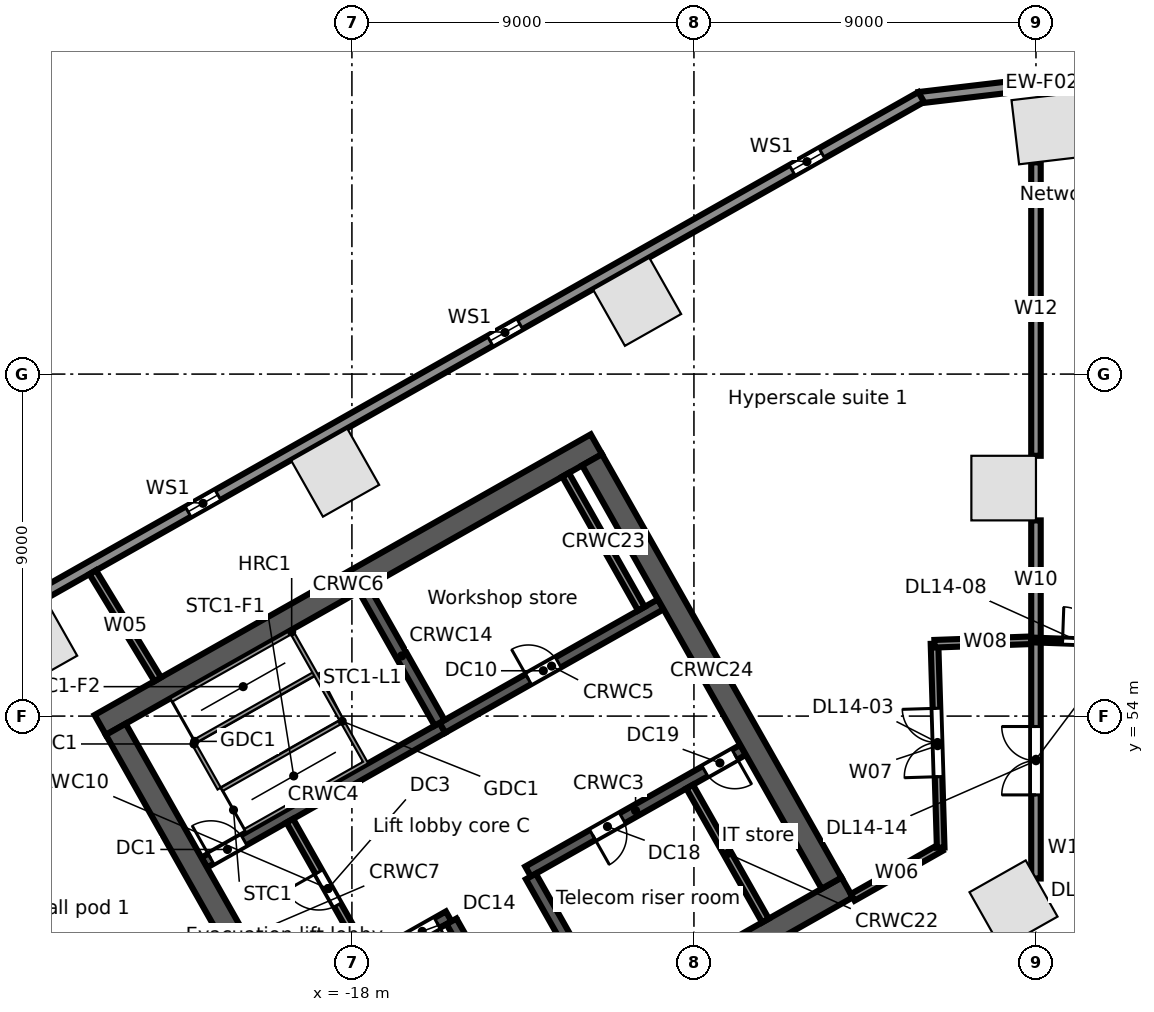
"""IFC4 building model, lengths in metres.
Left out: names, types, materials, properties, quantities, classifications, styles, units other than length and angle.
Written with IfcOpenShell. Run it as: python <this file> out.ifc"""

import sys

from ifc_helpers import new_model, si_unit, direction, frame, frame_2d, origin, origin_2d, place, context, subcontext, project, spatial, rectangle, extrude, element, fill, save


model = new_model("IFC4")
c1 = context("Model", 3, precision=1e-05, world=origin(), true_north=direction((0.0, 1.0)))
c2 = subcontext(c1, "Body", "Model", "MODEL_VIEW")
j1 = project(units=[si_unit("LENGTHUNIT", "METRE"), si_unit("PLANEANGLEUNIT", "RADIAN")], contexts=[c1])
p1 = place(None, origin())
s1 = spatial("IfcSite", under=j1, at=p1, CompositionType="ELEMENT")
p2 = place(p1, origin())
s2 = spatial("IfcBuilding", under=s1, at=p2, CompositionType="ELEMENT")
p3 = place(p2, frame((0.0, 0.0, 71.5)))
s3 = spatial("IfcBuildingStorey", under=s2, at=p3, CompositionType="ELEMENT", Elevation=71.5)
for number, where, z_axis, x_axis in (
    (1, (0.3, 69.464, 0.0), (0.0, 0.0, 1.0), (-0.993, -0.118, 0.0)),
    (2, (-10.495, 64.902, 0.0), (0.0, 0.0, 1.0), (-0.87, -0.492, 0.0)),
    (3, (-18.441, 60.406, 0.0), (0.0, 0.0, 1.0), (-0.87, -0.492, 0.0)),
    (4, (-26.388, 55.91, 0.0), (0.0, 0.0, 1.0), (-0.87, -0.492, 0.0)),
    (5, (-0.591, 49.044, 0.0), (0.0, 0.0, 1.0), (0.87, 0.492, 0.0)),
    (6, (-0.85, 60.0, 0.0), (0.0, 0.0, 1.0), (0.0, 1.0, 0.0)),
):
    element("IfcColumn", number, at=place(p3, frame(where, z_axis=z_axis, x_axis=x_axis)), inside=s3, PredefinedType="COLUMN", context=c2, shape_type="SweptSolid", body=[
        extrude(rectangle(XDim=1.7, YDim=1.7, at=origin_2d()), origin(), (0.0, 0.0, 1.0), 5.0),
    ])
p4 = place(p3, frame((-3.076, 70.273, 0.0), z_axis=(0.0, 0.0, 1.0), x_axis=(0.993067743007, 0.117543429416, 0.0)))
e7 = element("IfcWall", 7, at=p4, inside=s3, PredefinedType="STANDARD", context=c2, shape_type="SweptSolid", body=[
    extrude(rectangle(XDim=6.516, YDim=0.3, at=frame_2d((3.258, 0.0))), origin(), (0.0, 0.0, 1.0), 4.68),
])
p5 = place(p3, frame((-58.745, 38.764, 0.0), z_axis=(0.0, 0.0, 1.0), x_axis=(0.870355811726, 0.492423355453, 0.0)))
e8 = element("IfcWall", 8, at=p5, inside=s3, PredefinedType="STANDARD", context=c2, shape_type="SweptSolid", body=[
    extrude(rectangle(XDim=64.025, YDim=0.3, at=frame_2d((32.013, 0.0))), origin(), (0.0, 0.0, 1.0), 4.68),
])
p6 = place(p5, frame((60.122, 0.0, 0.6)))
e9 = element("IfcOpeningElement", 9, at=p6, cuts=e8, PredefinedType="OPENING", context=c2, shape_type="SweptSolid", body=[
    extrude(rectangle(XDim=0.9, YDim=3.2, at=frame_2d((0.45, 1.6))), frame((0.0, 0.16, 0.0), z_axis=(0.0, -1.0, 0.0), x_axis=(1.0, 0.0, 0.0)), (0.0, 0.0, 1.0), 0.32),
])
p7 = place(p5, frame((50.992, 0.0, 0.6)))
e10 = element("IfcOpeningElement", 10, at=p7, cuts=e8, PredefinedType="OPENING", context=c2, shape_type="SweptSolid", body=[
    extrude(rectangle(XDim=0.9, YDim=3.2, at=frame_2d((0.45, 1.6))), frame((0.0, 0.16, 0.0), z_axis=(0.0, -1.0, 0.0), x_axis=(1.0, 0.0, 0.0)), (0.0, 0.0, 1.0), 0.32),
])
p8 = place(p5, frame((41.862, 0.0, 0.6)))
e11 = element("IfcOpeningElement", 11, at=p8, cuts=e8, PredefinedType="OPENING", context=c2, shape_type="SweptSolid", body=[
    extrude(rectangle(XDim=0.9, YDim=3.2, at=frame_2d((0.45, 1.6))), frame((0.0, 0.16, 0.0), z_axis=(0.0, -1.0, 0.0), x_axis=(1.0, 0.0, 0.0)), (0.0, 0.0, 1.0), 0.32),
])
p9 = place(p5, frame((32.732, 0.0, 0.6)))
e12 = element("IfcOpeningElement", 12, at=p9, cuts=e8, PredefinedType="OPENING", context=c2, shape_type="SweptSolid", body=[
    extrude(rectangle(XDim=0.9, YDim=3.2, at=frame_2d((0.45, 1.6))), frame((0.0, 0.16, 0.0), z_axis=(0.0, -1.0, 0.0), x_axis=(1.0, 0.0, 0.0)), (0.0, 0.0, 1.0), 0.32),
])
p10 = place(p5, frame((23.602, 0.0, 0.6)))
e13 = element("IfcOpeningElement", 13, at=p10, cuts=e8, PredefinedType="OPENING", context=c2, shape_type="SweptSolid", body=[
    extrude(rectangle(XDim=0.9, YDim=3.2, at=frame_2d((0.45, 1.6))), frame((0.0, 0.16, 0.0), z_axis=(0.0, -1.0, 0.0), x_axis=(1.0, 0.0, 0.0)), (0.0, 0.0, 1.0), 0.32),
])
p11 = place(p5, frame((14.472, 0.0, 0.6)))
e14 = element("IfcOpeningElement", 14, at=p11, cuts=e8, PredefinedType="OPENING", context=c2, shape_type="SweptSolid", body=[
    extrude(rectangle(XDim=0.9, YDim=3.2, at=frame_2d((0.45, 1.6))), frame((0.0, 0.16, 0.0), z_axis=(0.0, -1.0, 0.0), x_axis=(1.0, 0.0, 0.0)), (0.0, 0.0, 1.0), 0.32),
])
p12 = place(p5, frame((5.342, 0.0, 0.6)))
e15 = element("IfcOpeningElement", 15, at=p12, cuts=e8, PredefinedType="OPENING", context=c2, shape_type="SweptSolid", body=[
    extrude(rectangle(XDim=0.9, YDim=3.2, at=frame_2d((0.45, 1.6))), frame((0.0, 0.16, 0.0), z_axis=(0.0, -1.0, 0.0), x_axis=(1.0, 0.0, 0.0)), (0.0, 0.0, 1.0), 0.32),
])
p13 = place(p3, frame((-31.778, 49.374, 0.0), z_axis=(0.0, 0.0, 1.0), x_axis=(0.492433046652, -0.870350328641, 0.0)))
e16 = element("IfcWall", 16, at=p13, inside=s3, PredefinedType="SOLIDWALL", context=c2, shape_type="SweptSolid", body=[
    extrude(rectangle(XDim=12.8, YDim=0.6, at=frame_2d((6.4, 0.0))), origin(), (0.0, 0.0, 1.0), 4.68),
])
p14 = place(p3, frame((-18.024, 42.104, 0.0), z_axis=(0.0, 0.0, 1.0), x_axis=(0.870360574057, 0.492414937962, 0.0)))
e17 = element("IfcWall", 17, at=p14, inside=s3, PredefinedType="SOLIDWALL", context=c2, shape_type="SweptSolid", body=[
    extrude(rectangle(XDim=15.0, YDim=0.6, at=frame_2d((7.5, 0.0))), origin(), (0.0, 0.0, 1.0), 4.68),
])
p15 = place(p14, frame((6.1, 0.0, 0.0)))
e18 = element("IfcOpeningElement", 18, at=p15, cuts=e17, PredefinedType="OPENING", context=c2, shape_type="SweptSolid", body=[
    extrude(rectangle(XDim=1.2, YDim=2.1, at=frame_2d((0.6, 1.05))), frame((0.0, 0.31, 0.0), z_axis=(0.0, -1.0, 0.0), x_axis=(1.0, 0.0, 0.0)), (0.0, 0.0, 1.0), 0.62),
])
p16 = place(p3, frame((-19.718, 46.316, 0.0), z_axis=(0.0, 0.0, 1.0), x_axis=(0.870353963862, 0.492426621528, 0.0)))
e19 = element("IfcWall", 19, at=p16, inside=s3, PredefinedType="SOLIDWALL", context=c2, shape_type="SweptSolid", body=[
    extrude(rectangle(XDim=4.9, YDim=0.3, at=frame_2d((2.45, 0.0))), origin(), (0.0, 0.0, 1.0), 4.68),
])
p17 = place(p16, frame((0.55, 0.0, 0.0)))
e20 = element("IfcOpeningElement", 20, at=p17, cuts=e19, PredefinedType="OPENING", context=c2, shape_type="SweptSolid", body=[
    extrude(rectangle(XDim=1.1, YDim=2.1, at=frame_2d((0.55, 1.05))), frame((0.0, 0.16, 0.0), z_axis=(0.0, -1.0, 0.0), x_axis=(1.0, 0.0, 0.0)), (0.0, 0.0, 1.0), 0.32),
])
p18 = place(p16, frame((3.65, 0.0, 0.0)))
e21 = element("IfcOpeningElement", 21, at=p18, cuts=e19, PredefinedType="OPENING", context=c2, shape_type="SweptSolid", body=[
    extrude(rectangle(XDim=0.9, YDim=2.1, at=frame_2d((0.45, 1.05))), frame((0.0, 0.16, 0.0), z_axis=(0.0, -1.0, 0.0), x_axis=(1.0, 0.0, 0.0)), (0.0, 0.0, 1.0), 0.32),
])
p19 = place(p3, frame((-13.365, 49.911, 0.0), z_axis=(0.0, 0.0, 1.0), x_axis=(0.870340995471, 0.49244954219, 0.0)))
e22 = element("IfcWall", 22, at=p19, inside=s3, PredefinedType="SOLIDWALL", context=c2, shape_type="SweptSolid", body=[
    extrude(rectangle(XDim=6.5, YDim=0.3, at=frame_2d((3.25, 0.0))), origin(), (0.0, 0.0, 1.0), 4.68),
])
p20 = place(p19, frame((1.95, 0.0, 0.0)))
e23 = element("IfcOpeningElement", 23, at=p20, cuts=e22, PredefinedType="OPENING", context=c2, shape_type="SweptSolid", body=[
    extrude(rectangle(XDim=0.9, YDim=2.1, at=frame_2d((0.45, 1.05))), frame((0.0, 0.16, 0.0), z_axis=(0.0, -1.0, 0.0), x_axis=(1.0, 0.0, 0.0)), (0.0, 0.0, 1.0), 0.32),
])
p21 = place(p19, frame((5.35, 0.0, 0.0)))
e24 = element("IfcOpeningElement", 24, at=p21, cuts=e22, PredefinedType="OPENING", context=c2, shape_type="SweptSolid", body=[
    extrude(rectangle(XDim=0.9, YDim=2.1, at=frame_2d((0.45, 1.05))), frame((0.0, 0.16, 0.0), z_axis=(0.0, -1.0, 0.0), x_axis=(1.0, 0.0, 0.0)), (0.0, 0.0, 1.0), 0.32),
])
p22 = place(p3, frame((-21.885, 50.146, 0.0), z_axis=(0.0, 0.0, 1.0), x_axis=(0.870359411463, 0.492416992881, 0.0)))
e25 = element("IfcWall", 25, at=p22, inside=s3, PredefinedType="SOLIDWALL", context=c2, shape_type="SweptSolid", body=[
    extrude(rectangle(XDim=7.2, YDim=0.3, at=frame_2d((3.6, 0.0))), origin(), (0.0, 0.0, 1.0), 4.68),
])
p23 = place(p22, frame((0.2, 0.0, 0.0)))
e26 = element("IfcOpeningElement", 26, at=p23, cuts=e25, PredefinedType="OPENING", context=c2, shape_type="SweptSolid", body=[
    extrude(rectangle(XDim=1.0, YDim=2.1, at=frame_2d((0.5, 1.05))), frame((0.0, 0.16, 0.0), z_axis=(0.0, -1.0, 0.0), x_axis=(1.0, 0.0, 0.0)), (0.0, 0.0, 1.0), 0.32),
])
p24 = place(p3, frame((-15.618, 53.691, 0.0), z_axis=(0.0, 0.0, 1.0), x_axis=(0.870356769198, 0.492421663121, 0.0)))
e27 = element("IfcWall", 27, at=p24, inside=s3, PredefinedType="SOLIDWALL", context=c2, shape_type="SweptSolid", body=[
    extrude(rectangle(XDim=6.6, YDim=0.3, at=frame_2d((3.3, 0.0))), origin(), (0.0, 0.0, 1.0), 4.68),
])
p25 = place(p24, frame((2.6, 0.0, 0.0)))
e28 = element("IfcOpeningElement", 28, at=p25, cuts=e27, PredefinedType="OPENING", context=c2, shape_type="SweptSolid", body=[
    extrude(rectangle(XDim=0.9, YDim=2.1, at=frame_2d((0.45, 1.05))), frame((0.0, 0.16, 0.0), z_axis=(0.0, -1.0, 0.0), x_axis=(1.0, 0.0, 0.0)), (0.0, 0.0, 1.0), 0.32),
])
p26 = place(p3, frame((-24.623, 53.767, 0.0), z_axis=(0.0, 0.0, 1.0), x_axis=(0.870356627484, 0.492421913601, 0.0)))
e29 = element("IfcWall", 29, at=p26, inside=s3, PredefinedType="SOLIDWALL", context=c2, shape_type="SweptSolid", body=[
    extrude(rectangle(XDim=15.0, YDim=0.6, at=frame_2d((7.5, 0.0))), origin(), (0.0, 0.0, 1.0), 4.68),
])
p27 = place(p3, frame((-24.214, 53.654, 0.0), z_axis=(0.0, 0.0, 1.0), x_axis=(0.492441221355, -0.870345703448, 0.0)))
e30 = element("IfcWall", 30, at=p27, inside=s3, PredefinedType="SOLIDWALL", context=c2, shape_type="SweptSolid", body=[
    extrude(rectangle(XDim=12.8, YDim=0.6, at=frame_2d((6.4, 0.0))), origin(), (0.0, 0.0, 1.0), 4.68),
])
p28 = place(p3, frame((-19.635, 51.246, 0.0), z_axis=(0.0, 0.0, 1.0), x_axis=(0.492408451753, -0.87036424366, 0.0)))
e31 = element("IfcWall", 31, at=p28, inside=s3, PredefinedType="PARTITIONING", context=c2, shape_type="SweptSolid", body=[
    extrude(rectangle(XDim=4.1, YDim=0.2, at=frame_2d((2.05, 0.0))), origin(), (0.0, 0.0, 1.0), 4.68),
])
p29 = place(p28, frame((1.55, 0.0, 0.0)))
e32 = element("IfcOpeningElement", 32, at=p29, cuts=e31, PredefinedType="OPENING", context=c2, shape_type="SweptSolid", body=[
    extrude(rectangle(XDim=1.0, YDim=2.1, at=frame_2d((0.5, 1.05))), frame((0.0, 0.11, 0.0), z_axis=(0.0, -1.0, 0.0), x_axis=(1.0, 0.0, 0.0)), (0.0, 0.0, 1.0), 0.22),
])
p30 = place(p3, frame((-15.379, 48.599, 0.0), z_axis=(0.0, 0.0, 1.0), x_axis=(0.492394910396, -0.870371904542, 0.0)))
e33 = element("IfcWall", 33, at=p30, inside=s3, PredefinedType="SOLIDWALL", context=c2, shape_type="SweptSolid", body=[
    extrude(rectangle(XDim=4.05, YDim=0.3, at=frame_2d((2.025, 0.0))), origin(), (0.0, 0.0, 1.0), 4.68),
])
p31 = place(p3, frame((-17.686, 57.347, 0.0), z_axis=(0.0, 0.0, 1.0), x_axis=(0.492420746998, -0.870357287513, 0.0)))
e34 = element("IfcWall", 34, at=p31, inside=s3, PredefinedType="SOLIDWALL", context=c2, shape_type="SweptSolid", body=[
    extrude(rectangle(XDim=4.05, YDim=0.3, at=frame_2d((2.025, 0.0))), origin(), (0.0, 0.0, 1.0), 4.68),
])
p32 = place(p3, frame((-13.291, 49.781, 0.0), z_axis=(0.0, 0.0, 1.0), x_axis=(0.492394910396, -0.870371904542, 0.0)))
e35 = element("IfcWall", 35, at=p32, inside=s3, PredefinedType="SOLIDWALL", context=c2, shape_type="SweptSolid", body=[
    extrude(rectangle(XDim=4.05, YDim=0.3, at=frame_2d((2.025, 0.0))), origin(), (0.0, 0.0, 1.0), 4.68),
])
p33 = place(p3, frame((-9.113, 52.144, 0.0), z_axis=(0.0, 0.0, 1.0), x_axis=(0.492394910396, -0.870371904542, 0.0)))
e36 = element("IfcWall", 36, at=p33, inside=s3, PredefinedType="PARTITIONING", context=c2, shape_type="SweptSolid", body=[
    extrude(rectangle(XDim=4.05, YDim=0.2, at=frame_2d((2.025, 0.0))), origin(), (0.0, 0.0, 1.0), 4.68),
])
p34 = place(p3, frame((-12.377, 60.351, 0.0), z_axis=(0.0, 0.0, 1.0), x_axis=(0.492440575896, -0.870346068648, 0.0)))
e37 = element("IfcWall", 37, at=p34, inside=s3, PredefinedType="SOLIDWALL", context=c2, shape_type="SweptSolid", body=[
    extrude(rectangle(XDim=4.05, YDim=0.2, at=frame_2d((2.025, 0.0))), origin(), (0.0, 0.0, 1.0), 4.68),
])
p35 = place(p3, frame((-11.681, 60.744, 0.0), z_axis=(0.0, 0.0, 1.0), x_axis=(0.492426772896, -0.870353878221, 0.0)))
e38 = element("IfcWall", 38, at=p35, inside=s3, PredefinedType="SOLIDWALL", context=c2, shape_type="SweptSolid", body=[
    extrude(rectangle(XDim=12.8, YDim=0.6, at=frame_2d((6.4, 0.0))), origin(), (0.0, 0.0, 1.0), 4.68),
])
p36 = place(p3, frame((-24.82, 57.785, 0.0), z_axis=(0.0, 0.0, 1.0), x_axis=(0.519183013025, -0.854663090923, 0.0)))
e39 = element("IfcWall", 39, at=p36, inside=s3, PredefinedType="PARTITIONING", context=c2, shape_type="SweptSolid", body=[
    extrude(rectangle(XDim=3.296, YDim=0.2, at=frame_2d((1.648, 0.0))), origin(), (0.0, 0.0, 1.0), 3.96),
])
p37 = place(p3, frame((-4.821, 49.23, 0.0), z_axis=(0.0, 0.0, 1.0), x_axis=(0.870371217631, 0.492396124598, 0.0)))
e40 = element("IfcWall", 40, at=p37, inside=s3, PredefinedType="PARTITIONING", context=c2, shape_type="SweptSolid", body=[
    extrude(rectangle(XDim=2.659, YDim=0.2, at=frame_2d((1.329, 0.0))), origin(), (0.0, 0.0, 1.0), 4.68),
])
p38 = place(p3, frame((-2.67, 55.904, 0.0), z_axis=(0.0, 0.0, 1.0), x_axis=(0.030338701418, -0.999539675649, 0.0)))
e41 = element("IfcWall", 41, at=p38, inside=s3, PredefinedType="PARTITIONING", context=c2, shape_type="SweptSolid", body=[
    extrude(rectangle(XDim=5.367, YDim=0.2, at=frame_2d((2.684, 0.0))), origin(), (0.0, 0.0, 1.0), 4.68),
])
p39 = place(p38, frame((1.7, 0.0, 0.0)))
e42 = element("IfcOpeningElement", 42, at=p39, cuts=e41, PredefinedType="OPENING", context=c2, shape_type="SweptSolid", body=[
    extrude(rectangle(XDim=1.8, YDim=2.1, at=frame_2d((0.9, 1.05))), frame((0.0, 0.11, 0.0), z_axis=(0.0, -1.0, 0.0), x_axis=(1.0, 0.0, 0.0)), (0.0, 0.0, 1.0), 0.22),
])
p40 = place(p3, frame((-2.67, 55.904, 0.0), z_axis=(0.0, 0.0, 1.0), x_axis=(0.999354913865, 0.03591317494, 0.0)))
e43 = element("IfcWall", 43, at=p40, inside=s3, PredefinedType="PARTITIONING", context=c2, shape_type="SweptSolid", body=[
    extrude(rectangle(XDim=2.672, YDim=0.2, at=frame_2d((1.336, 0.0))), origin(), (0.0, 0.0, 1.0), 3.742),
])
p41 = place(p3, frame((0.0, 49.726, 0.0), z_axis=(0.0, 0.0, 1.0), x_axis=(0.0, 1.0, 0.0)))
e44 = element("IfcWall", 44, at=p41, inside=s3, PredefinedType="PARTITIONING", context=c2, shape_type="SweptSolid", body=[
    extrude(rectangle(XDim=6.274, YDim=0.25, at=frame_2d((3.137, 0.0))), origin(), (0.0, 0.0, 1.0), 4.68),
])
p42 = place(p41, frame((2.2, 0.0, 0.0)))
e45 = element("IfcOpeningElement", 45, at=p42, cuts=e44, PredefinedType="OPENING", context=c2, shape_type="SweptSolid", body=[
    extrude(rectangle(XDim=1.8, YDim=2.1, at=frame_2d((0.9, 1.05))), frame((0.0, 0.135, 0.0), z_axis=(0.0, -1.0, 0.0), x_axis=(1.0, 0.0, 0.0)), (0.0, 0.0, 1.0), 0.27),
])
p43 = place(p3, frame((0.0, 56.0, 0.0), z_axis=(0.0, 0.0, 1.0), x_axis=(0.0, 1.0, 0.0)))
e46 = element("IfcWall", 46, at=p43, inside=s3, PredefinedType="PARTITIONING", context=c2, shape_type="SweptSolid", body=[
    extrude(rectangle(XDim=3.15, YDim=0.25, at=frame_2d((1.575, 0.0))), origin(), (0.0, 0.0, 1.0), 4.68),
])
p44 = place(p3, frame((0.0, 56.0, 0.0), z_axis=(0.0, 0.0, 1.0), x_axis=(0.999349313684, -0.036068673934, 0.0)))
e47 = element("IfcWall", 47, at=p44, inside=s3, PredefinedType="PARTITIONING", context=c2, shape_type="SweptSolid", body=[
    extrude(rectangle(XDim=2.471, YDim=0.125, at=frame_2d((1.235, 0.0))), origin(), (0.0, 0.0, 1.0), 4.68),
])
p45 = place(p44, frame((0.7, 0.0, 0.0)))
e48 = element("IfcOpeningElement", 48, at=p45, cuts=e47, PredefinedType="OPENING", context=c2, shape_type="SweptSolid", body=[
    extrude(rectangle(XDim=0.9, YDim=2.1, at=frame_2d((0.45, 1.05))), frame((0.0, 0.073, 0.0), z_axis=(0.0, -1.0, 0.0), x_axis=(1.0, 0.0, 0.0)), (0.0, 0.0, 1.0), 0.145),
])
p46 = place(p3, frame((0.0, 60.85, 0.0), z_axis=(0.0, 0.0, 1.0), x_axis=(0.0, 1.0, 0.0)))
e49 = element("IfcWall", 49, at=p46, inside=s3, PredefinedType="PARTITIONING", context=c2, shape_type="SweptSolid", body=[
    extrude(rectangle(XDim=7.723, YDim=0.25, at=frame_2d((3.861, 0.0))), origin(), (0.0, 0.0, 1.0), 3.952),
])
p47 = place(p6, origin())
e50 = element("IfcWindow", 50, at=p47, inside=s3, PartitioningType="SINGLE_PANEL", PredefinedType="WINDOW", context=c2, shape_type="SweptSolid", body=[
    extrude(rectangle(XDim=0.9, YDim=3.2, at=frame_2d((0.45, 1.6))), frame((0.0, 0.03, 0.0), z_axis=(0.0, -1.0, 0.0), x_axis=(1.0, 0.0, 0.0)), (0.0, 0.0, 1.0), 0.06),
])
fill(e9, e50)
p48 = place(p7, origin())
e51 = element("IfcWindow", 51, at=p48, inside=s3, PartitioningType="SINGLE_PANEL", PredefinedType="WINDOW", context=c2, shape_type="SweptSolid", body=[
    extrude(rectangle(XDim=0.9, YDim=3.2, at=frame_2d((0.45, 1.6))), frame((0.0, 0.03, 0.0), z_axis=(0.0, -1.0, 0.0), x_axis=(1.0, 0.0, 0.0)), (0.0, 0.0, 1.0), 0.06),
])
fill(e10, e51)
p49 = place(p8, origin())
e52 = element("IfcWindow", 52, at=p49, inside=s3, PartitioningType="SINGLE_PANEL", PredefinedType="WINDOW", context=c2, shape_type="SweptSolid", body=[
    extrude(rectangle(XDim=0.9, YDim=3.2, at=frame_2d((0.45, 1.6))), frame((0.0, 0.03, 0.0), z_axis=(0.0, -1.0, 0.0), x_axis=(1.0, 0.0, 0.0)), (0.0, 0.0, 1.0), 0.06),
])
fill(e11, e52)
p50 = place(p23, origin())
e53 = element("IfcDoor", 53, at=p50, inside=s3, OperationType="SINGLE_SWING_LEFT", PredefinedType="DOOR", context=c2, shape_type="SweptSolid", body=[
    extrude(rectangle(XDim=1.0, YDim=2.1, at=frame_2d((0.5, 1.05))), frame((0.0, 0.025, 0.0), z_axis=(0.0, -1.0, 0.0), x_axis=(1.0, 0.0, 0.0)), (0.0, 0.0, 1.0), 0.05),
])
fill(e26, e53)
p51 = place(p29, frame((1.0, 0.0, 0.0), z_axis=(0.0, 0.0, 1.0), x_axis=(-1.0, 0.0, 0.0)))
e54 = element("IfcDoor", 54, at=p51, inside=s3, OperationType="SINGLE_SWING_RIGHT", PredefinedType="DOOR", context=c2, shape_type="SweptSolid", body=[
    extrude(rectangle(XDim=1.0, YDim=2.1, at=frame_2d((0.5, 1.05))), frame((0.0, 0.025, 0.0), z_axis=(0.0, -1.0, 0.0), x_axis=(1.0, 0.0, 0.0)), (0.0, 0.0, 1.0), 0.05),
])
fill(e32, e54)
p52 = place(p25, origin())
e55 = element("IfcDoor", 55, at=p52, inside=s3, OperationType="SINGLE_SWING_LEFT", PredefinedType="DOOR", context=c2, shape_type="SweptSolid", body=[
    extrude(rectangle(XDim=0.9, YDim=2.1, at=frame_2d((0.45, 1.05))), frame((0.0, 0.025, 0.0), z_axis=(0.0, -1.0, 0.0), x_axis=(1.0, 0.0, 0.0)), (0.0, 0.0, 1.0), 0.05),
])
fill(e28, e55)
p53 = place(p18, frame((0.9, 0.0, 0.0), z_axis=(0.0, 0.0, 1.0), x_axis=(-1.0, 0.0, 0.0)))
e56 = element("IfcDoor", 56, at=p53, inside=s3, OperationType="SINGLE_SWING_LEFT", PredefinedType="DOOR", context=c2, shape_type="SweptSolid", body=[
    extrude(rectangle(XDim=0.9, YDim=2.1, at=frame_2d((0.45, 1.05))), frame((0.0, 0.025, 0.0), z_axis=(0.0, -1.0, 0.0), x_axis=(1.0, 0.0, 0.0)), (0.0, 0.0, 1.0), 0.05),
])
fill(e21, e56)
p54 = place(p20, frame((0.9, 0.0, 0.0), z_axis=(0.0, 0.0, 1.0), x_axis=(-1.0, 0.0, 0.0)))
e57 = element("IfcDoor", 57, at=p54, inside=s3, OperationType="SINGLE_SWING_RIGHT", PredefinedType="DOOR", context=c2, shape_type="SweptSolid", body=[
    extrude(rectangle(XDim=0.9, YDim=2.1, at=frame_2d((0.45, 1.05))), frame((0.0, 0.025, 0.0), z_axis=(0.0, -1.0, 0.0), x_axis=(1.0, 0.0, 0.0)), (0.0, 0.0, 1.0), 0.05),
])
fill(e23, e57)
p55 = place(p21, frame((0.9, 0.0, 0.0), z_axis=(0.0, 0.0, 1.0), x_axis=(-1.0, 0.0, 0.0)))
e58 = element("IfcDoor", 58, at=p55, inside=s3, OperationType="SINGLE_SWING_LEFT", PredefinedType="DOOR", context=c2, shape_type="SweptSolid", body=[
    extrude(rectangle(XDim=0.9, YDim=2.1, at=frame_2d((0.45, 1.05))), frame((0.0, 0.025, 0.0), z_axis=(0.0, -1.0, 0.0), x_axis=(1.0, 0.0, 0.0)), (0.0, 0.0, 1.0), 0.05),
])
fill(e24, e58)
p56 = place(p39, frame((1.8, 0.0, 0.0), z_axis=(0.0, 0.0, 1.0), x_axis=(-1.0, 0.0, 0.0)))
e59 = element("IfcDoor", 59, at=p56, inside=s3, OperationType="DOUBLE_DOOR_SINGLE_SWING", PredefinedType="DOOR", context=c2, shape_type="SweptSolid", body=[
    extrude(rectangle(XDim=1.8, YDim=2.1, at=frame_2d((0.9, 1.05))), frame((0.0, 0.025, 0.0), z_axis=(0.0, -1.0, 0.0), x_axis=(1.0, 0.0, 0.0)), (0.0, 0.0, 1.0), 0.05),
])
fill(e42, e59)
p57 = place(p45, origin())
e60 = element("IfcDoor", 60, at=p57, inside=s3, OperationType="SINGLE_SWING_LEFT", PredefinedType="DOOR", context=c2, shape_type="SweptSolid", body=[
    extrude(rectangle(XDim=0.9, YDim=2.1, at=frame_2d((0.45, 1.05))), frame((0.0, 0.025, 0.0), z_axis=(0.0, -1.0, 0.0), x_axis=(1.0, 0.0, 0.0)), (0.0, 0.0, 1.0), 0.05),
])
fill(e48, e60)
p58 = place(p42, origin())
e61 = element("IfcDoor", 61, at=p58, inside=s3, OperationType="DOUBLE_DOOR_SINGLE_SWING", PredefinedType="DOOR", context=c2, shape_type="SweptSolid", body=[
    extrude(rectangle(XDim=1.8, YDim=2.1, at=frame_2d((0.9, 1.05))), frame((0.0, 0.025, 0.0), z_axis=(0.0, -1.0, 0.0), x_axis=(1.0, 0.0, 0.0)), (0.0, 0.0, 1.0), 0.05),
])
fill(e45, e61)
save(model, sys.argv[1])
